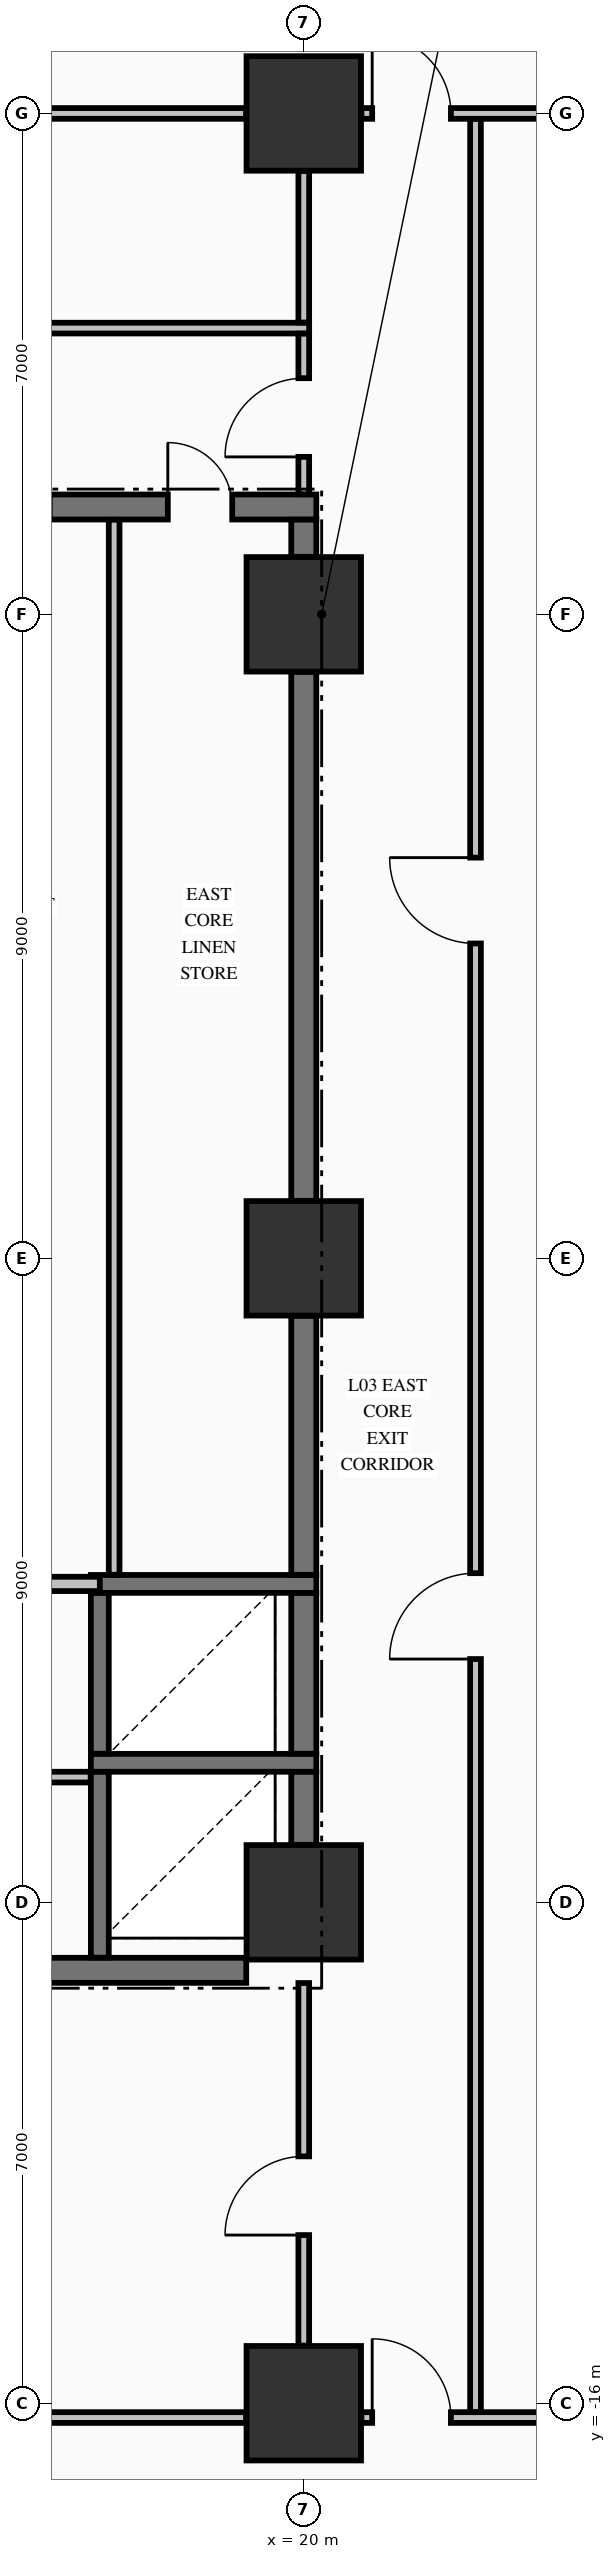
"""IFC4 building model, lengths in metres.
Left out: names, types, materials, properties, quantities, classifications, styles, units other than length and angle.
Written with IfcOpenShell. Run it as: python <this file> out.ifc"""

import sys

from ifc_helpers import new_model, si_unit, direction, frame, frame_2d, origin, origin_2d, place, context, subcontext, project, spatial, rectangle, extrude, element, fill, save


model = new_model("IFC4")
c1 = context("Model", 3, precision=1e-05, world=origin(), true_north=direction((0.0, 1.0)))
c2 = subcontext(c1, "Body", "Model", "MODEL_VIEW")
j1 = project(units=[si_unit("LENGTHUNIT", "METRE"), si_unit("PLANEANGLEUNIT", "RADIAN")], contexts=[c1])
p1 = place(None, origin())
s1 = spatial("IfcSite", under=j1, at=p1, CompositionType="ELEMENT")
p2 = place(p1, origin())
s2 = spatial("IfcBuilding", under=s1, at=p2, CompositionType="ELEMENT")
p3 = place(p2, frame((0.0, 0.0, 16.32)))
s3 = spatial("IfcBuildingStorey", under=s2, at=p3, CompositionType="ELEMENT", Elevation=16.32)
for number, where, z_axis, x_axis in (
    (1, (20.0, -16.0, 0.0), (0.0, 0.0, 1.0), (1.0, 0.0, 0.0)),
    (2, (20.0, -9.0, 0.0), (0.0, 0.0, 1.0), (1.0, 0.0, 0.0)),
    (3, (20.0, 0.0, 0.0), (0.0, 0.0, 1.0), (1.0, 0.0, 0.0)),
    (4, (20.0, 9.0, 0.0), (0.0, 0.0, 1.0), (1.0, 0.0, 0.0)),
    (5, (20.0, 16.0, 0.0), (0.0, 0.0, 1.0), (1.0, 0.0, 0.0)),
):
    element("IfcColumn", number, at=place(p3, frame(where, z_axis=z_axis, x_axis=x_axis)), inside=s3, PredefinedType="COLUMN", context=c2, shape_type="SweptSolid", body=[
        extrude(rectangle(XDim=1.6, YDim=1.6, at=origin_2d()), origin(), (0.0, 0.0, 1.0), 4.99),
    ])
p4 = place(p3, frame((14.7, -9.95, 0.0), z_axis=(0.0, 0.0, 1.0), x_axis=(1.0, 0.0, 0.0)))
e6 = element("IfcWall", 6, at=p4, inside=s3, PredefinedType="SHEAR", context=c2, shape_type="SweptSolid", body=[
    extrude(rectangle(XDim=4.496, YDim=0.35, at=frame_2d((2.248, 0.0))), origin(), (0.0, 0.0, 1.0), 4.99),
])
p5 = place(p4, frame((0.8, 0.0, 0.0)))
e7 = element("IfcOpeningElement", 7, at=p5, cuts=e6, PredefinedType="OPENING", context=c2, shape_type="SweptSolid", body=[
    extrude(rectangle(XDim=0.9, YDim=2.15, at=frame_2d((0.45, 1.075))), frame((0.0, 0.185, 0.0), z_axis=(0.0, -1.0, 0.0), x_axis=(1.0, 0.0, 0.0)), (0.0, 0.0, 1.0), 0.37),
])
for number, where, z_axis, x_axis in (
    (8, (17.025, -7.05, 0.0), (0.0, 0.0, 1.0), (1.0, 0.0, 0.0)),
    (9, (17.025, -4.55, 0.0), (0.0, 0.0, 1.0), (1.0, 0.0, 0.0)),
):
    element("IfcWall", number, at=place(p3, frame(where, z_axis=z_axis, x_axis=x_axis)), inside=s3, PredefinedType="SOLIDWALL", context=c2, shape_type="SweptSolid", body=[
        extrude(rectangle(XDim=3.15, YDim=0.25, at=frame_2d((1.575, 0.0))), origin(), (0.0, 0.0, 1.0), 4.99),
    ])
p6 = place(p3, frame((14.7, 10.5, 0.0), z_axis=(0.0, 0.0, 1.0), x_axis=(1.0, 0.0, 0.0)))
e10 = element("IfcWall", 10, at=p6, inside=s3, PredefinedType="SHEAR", context=c2, shape_type="SweptSolid", body=[
    extrude(rectangle(XDim=5.475, YDim=0.35, at=frame_2d((2.738, 0.0))), origin(), (0.0, 0.0, 1.0), 4.99),
])
p7 = place(p6, frame((0.85, 0.0, 0.0)))
e11 = element("IfcOpeningElement", 11, at=p7, cuts=e10, PredefinedType="OPENING", context=c2, shape_type="SweptSolid", body=[
    extrude(rectangle(XDim=0.9, YDim=2.15, at=frame_2d((0.45, 1.075))), frame((0.0, 0.185, 0.0), z_axis=(0.0, -1.0, 0.0), x_axis=(1.0, 0.0, 0.0)), (0.0, 0.0, 1.0), 0.37),
])
p8 = place(p6, frame((3.4, 0.0, 0.0)))
e12 = element("IfcOpeningElement", 12, at=p8, cuts=e10, PredefinedType="OPENING", context=c2, shape_type="SweptSolid", body=[
    extrude(rectangle(XDim=0.9, YDim=2.15, at=frame_2d((0.45, 1.075))), frame((0.0, 0.185, 0.0), z_axis=(0.0, -1.0, 0.0), x_axis=(1.0, 0.0, 0.0)), (0.0, 0.0, 1.0), 0.37),
])
p9 = place(p3, frame((11.806, -16.2, 0.0), z_axis=(0.0, 0.0, 1.0), x_axis=(1.0, 0.0, 0.0)))
e13 = element("IfcWall", 13, at=p9, inside=s3, PredefinedType="PARTITIONING", context=c2, shape_type="SweptSolid", body=[
    extrude(rectangle(XDim=7.388, YDim=0.15, at=frame_2d((3.694, 0.0))), origin(), (0.0, 0.0, 1.0), 3.332),
])
p10 = place(p9, frame((3.094, 0.0, 0.0)))
e14 = element("IfcOpeningElement", 14, at=p10, cuts=e13, PredefinedType="OPENING", context=c2, shape_type="SweptSolid", body=[
    extrude(rectangle(XDim=1.2, YDim=2.15, at=frame_2d((0.6, 1.075))), frame((0.0, 0.085, 0.0), z_axis=(0.0, -1.0, 0.0), x_axis=(1.0, 0.0, 0.0)), (0.0, 0.0, 1.0), 0.17),
])
p11 = place(p3, frame((20.806, -16.2, 0.0), z_axis=(0.0, 0.0, 1.0), x_axis=(1.0, 0.0, 0.0)))
e15 = element("IfcWall", 15, at=p11, inside=s3, PredefinedType="PARTITIONING", context=c2, shape_type="SweptSolid", body=[
    extrude(rectangle(XDim=4.488, YDim=0.15, at=frame_2d((2.244, 0.0))), origin(), (0.0, 0.0, 1.0), 3.332),
])
p12 = place(p11, frame((0.15, 0.0, 0.0)))
e16 = element("IfcOpeningElement", 16, at=p12, cuts=e15, PredefinedType="OPENING", context=c2, shape_type="SweptSolid", body=[
    extrude(rectangle(XDim=1.1, YDim=2.15, at=frame_2d((0.55, 1.075))), frame((0.0, 0.085, 0.0), z_axis=(0.0, -1.0, 0.0), x_axis=(1.0, 0.0, 0.0)), (0.0, 0.0, 1.0), 0.17),
])
p13 = place(p11, frame((2.844, 0.0, 0.0)))
e17 = element("IfcOpeningElement", 17, at=p13, cuts=e15, PredefinedType="OPENING", context=c2, shape_type="SweptSolid", body=[
    extrude(rectangle(XDim=1.1, YDim=2.15, at=frame_2d((0.55, 1.075))), frame((0.0, 0.085, 0.0), z_axis=(0.0, -1.0, 0.0), x_axis=(1.0, 0.0, 0.0)), (0.0, 0.0, 1.0), 0.17),
])
p14 = place(p3, frame((14.878, -7.25, 0.0), z_axis=(0.0, 0.0, 1.0), x_axis=(1.0, 0.0, 0.0)))
e18 = element("IfcWall", 18, at=p14, inside=s3, PredefinedType="PARTITIONING", context=c2, shape_type="SweptSolid", body=[
    extrude(rectangle(XDim=2.144, YDim=0.15, at=frame_2d((1.072, 0.0))), origin(), (0.0, 0.0, 1.0), 4.99),
])
p15 = place(p14, frame((0.597, 0.0, 0.0)))
e19 = element("IfcOpeningElement", 19, at=p15, cuts=e18, PredefinedType="OPENING", context=c2, shape_type="SweptSolid", body=[
    extrude(rectangle(XDim=0.95, YDim=2.15, at=frame_2d((0.475, 1.075))), frame((0.0, 0.085, 0.0), z_axis=(0.0, -1.0, 0.0), x_axis=(1.0, 0.0, 0.0)), (0.0, 0.0, 1.0), 0.17),
])
p16 = place(p3, frame((14.878, -4.55, 0.0), z_axis=(0.0, 0.0, 1.0), x_axis=(1.0, 0.0, 0.0)))
e20 = element("IfcWall", 20, at=p16, inside=s3, PredefinedType="PARTITIONING", context=c2, shape_type="SweptSolid", body=[
    extrude(rectangle(XDim=2.272, YDim=0.2, at=frame_2d((1.136, 0.0))), origin(), (0.0, 0.0, 1.0), 4.99),
])
p17 = place(p3, frame((8.66, 13.0, 0.0), z_axis=(0.0, 0.0, 1.0), x_axis=(1.0, 0.0, 0.0)))
e21 = element("IfcWall", 21, at=p17, inside=s3, PredefinedType="PARTITIONING", context=c2, shape_type="SweptSolid", body=[
    extrude(rectangle(XDim=11.415, YDim=0.15, at=frame_2d((5.708, 0.0))), origin(), (0.0, 0.0, 1.0), 4.99),
])
p18 = place(p17, frame((0.59, 0.0, 0.0)))
e22 = element("IfcOpeningElement", 22, at=p18, cuts=e21, PredefinedType="OPENING", context=c2, shape_type="SweptSolid", body=[
    extrude(rectangle(XDim=1.1, YDim=2.15, at=frame_2d((0.55, 1.075))), frame((0.0, 0.085, 0.0), z_axis=(0.0, -1.0, 0.0), x_axis=(1.0, 0.0, 0.0)), (0.0, 0.0, 1.0), 0.17),
])
p19 = place(p3, frame((11.806, 16.0, 0.0), z_axis=(0.0, 0.0, 1.0), x_axis=(1.0, 0.0, 0.0)))
e23 = element("IfcWall", 23, at=p19, inside=s3, PredefinedType="PARTITIONING", context=c2, shape_type="SweptSolid", body=[
    extrude(rectangle(XDim=7.388, YDim=0.15, at=frame_2d((3.694, 0.0))), origin(), (0.0, 0.0, 1.0), 3.332),
])
p20 = place(p19, frame((3.144, 0.0, 0.0)))
e24 = element("IfcOpeningElement", 24, at=p20, cuts=e23, PredefinedType="OPENING", context=c2, shape_type="SweptSolid", body=[
    extrude(rectangle(XDim=1.1, YDim=2.15, at=frame_2d((0.55, 1.075))), frame((0.0, 0.085, 0.0), z_axis=(0.0, -1.0, 0.0), x_axis=(1.0, 0.0, 0.0)), (0.0, 0.0, 1.0), 0.17),
])
p21 = place(p3, frame((20.806, 16.0, 0.0), z_axis=(0.0, 0.0, 1.0), x_axis=(1.0, 0.0, 0.0)))
e25 = element("IfcWall", 25, at=p21, inside=s3, PredefinedType="PARTITIONING", context=c2, shape_type="SweptSolid", body=[
    extrude(rectangle(XDim=4.488, YDim=0.15, at=frame_2d((2.244, 0.0))), origin(), (0.0, 0.0, 1.0), 3.332),
])
p22 = place(p21, frame((0.15, 0.0, 0.0)))
e26 = element("IfcOpeningElement", 26, at=p22, cuts=e25, PredefinedType="OPENING", context=c2, shape_type="SweptSolid", body=[
    extrude(rectangle(XDim=1.1, YDim=2.15, at=frame_2d((0.55, 1.075))), frame((0.0, 0.085, 0.0), z_axis=(0.0, -1.0, 0.0), x_axis=(1.0, 0.0, 0.0)), (0.0, 0.0, 1.0), 0.17),
])
p23 = place(p21, frame((2.844, 0.0, 0.0)))
e27 = element("IfcOpeningElement", 27, at=p23, cuts=e25, PredefinedType="OPENING", context=c2, shape_type="SweptSolid", body=[
    extrude(rectangle(XDim=1.1, YDim=2.15, at=frame_2d((0.55, 1.075))), frame((0.0, 0.085, 0.0), z_axis=(0.0, -1.0, 0.0), x_axis=(1.0, 0.0, 0.0)), (0.0, 0.0, 1.0), 0.17),
])
p24 = place(p3, frame((17.15, -9.773, 0.0), z_axis=(0.0, 0.0, 1.0), x_axis=(0.0, 1.0, 0.0)))
e28 = element("IfcWall", 28, at=p24, inside=s3, PredefinedType="SOLIDWALL", context=c2, shape_type="SweptSolid", body=[
    extrude(rectangle(XDim=2.596, YDim=0.25, at=frame_2d((1.298, 0.0))), origin(), (0.0, 0.0, 1.0), 4.99),
])
p25 = place(p3, frame((17.15, -6.923, 0.0), z_axis=(0.0, 0.0, 1.0), x_axis=(0.0, 1.0, 0.0)))
e29 = element("IfcWall", 29, at=p25, inside=s3, PredefinedType="SOLIDWALL", context=c2, shape_type="SweptSolid", body=[
    extrude(rectangle(XDim=2.246, YDim=0.25, at=frame_2d((1.123, 0.0))), origin(), (0.0, 0.0, 1.0), 4.99),
])
p26 = place(p3, frame((20.0, -8.196, 0.0), z_axis=(0.0, 0.0, 1.0), x_axis=(0.0, 1.0, 0.0)))
e30 = element("IfcWall", 30, at=p26, inside=s3, PredefinedType="SHEAR", context=c2, shape_type="SweptSolid", body=[
    extrude(rectangle(XDim=1.019, YDim=0.35, at=frame_2d((0.51, 0.0))), origin(), (0.0, 0.0, 1.0), 4.99),
])
p27 = place(p3, frame((20.0, -6.923, 0.0), z_axis=(0.0, 0.0, 1.0), x_axis=(0.0, 1.0, 0.0)))
e31 = element("IfcWall", 31, at=p27, inside=s3, PredefinedType="SHEAR", context=c2, shape_type="SweptSolid", body=[
    extrude(rectangle(XDim=2.246, YDim=0.35, at=frame_2d((1.123, 0.0))), origin(), (0.0, 0.0, 1.0), 4.99),
])
p28 = place(p3, frame((20.0, -4.423, 0.0), z_axis=(0.0, 0.0, 1.0), x_axis=(0.0, 1.0, 0.0)))
e32 = element("IfcWall", 32, at=p28, inside=s3, PredefinedType="SHEAR", context=c2, shape_type="SweptSolid", body=[
    extrude(rectangle(XDim=3.619, YDim=0.35, at=frame_2d((1.81, 0.0))), origin(), (0.0, 0.0, 1.0), 4.99),
])
p29 = place(p3, frame((20.0, 0.804, 0.0), z_axis=(0.0, 0.0, 1.0), x_axis=(0.0, 1.0, 0.0)))
e33 = element("IfcWall", 33, at=p29, inside=s3, PredefinedType="SHEAR", context=c2, shape_type="SweptSolid", body=[
    extrude(rectangle(XDim=7.392, YDim=0.35, at=frame_2d((3.696, 0.0))), origin(), (0.0, 0.0, 1.0), 4.99),
])
p30 = place(p3, frame((20.0, 9.804, 0.0), z_axis=(0.0, 0.0, 1.0), x_axis=(0.0, 1.0, 0.0)))
e34 = element("IfcWall", 34, at=p30, inside=s3, PredefinedType="SHEAR", context=c2, shape_type="SweptSolid", body=[
    extrude(rectangle(XDim=0.519, YDim=0.35, at=frame_2d((0.26, 0.0))), origin(), (0.0, 0.0, 1.0), 4.99),
])
p31 = place(p3, frame((17.35, -4.422, 0.0), z_axis=(0.0, 0.0, 1.0), x_axis=(0.0, 1.0, 0.0)))
e35 = element("IfcWall", 35, at=p31, inside=s3, PredefinedType="PARTITIONING", context=c2, shape_type="SweptSolid", body=[
    extrude(rectangle(XDim=14.744, YDim=0.15, at=frame_2d((7.372, 0.0))), origin(), (0.0, 0.0, 1.0), 4.99),
])
p32 = place(p3, frame((20.0, -15.194, 0.0), z_axis=(0.0, 0.0, 1.0), x_axis=(0.0, 1.0, 0.0)))
e36 = element("IfcWall", 36, at=p32, inside=s3, PredefinedType="PARTITIONING", context=c2, shape_type="SweptSolid", body=[
    extrude(rectangle(XDim=5.066, YDim=0.15, at=frame_2d((2.533, 0.0))), origin(), (0.0, 0.0, 1.0), 4.032),
])
p33 = place(p32, frame((1.544, 0.0, 0.0)))
e37 = element("IfcOpeningElement", 37, at=p33, cuts=e36, PredefinedType="OPENING", context=c2, shape_type="SweptSolid", body=[
    extrude(rectangle(XDim=1.1, YDim=2.15, at=frame_2d((0.55, 1.075))), frame((0.0, 0.085, 0.0), z_axis=(0.0, -1.0, 0.0), x_axis=(1.0, 0.0, 0.0)), (0.0, 0.0, 1.0), 0.17),
])
p34 = place(p3, frame((20.0, 10.678, 0.0), z_axis=(0.0, 0.0, 1.0), x_axis=(0.0, 1.0, 0.0)))
e38 = element("IfcWall", 38, at=p34, inside=s3, PredefinedType="PARTITIONING", context=c2, shape_type="SweptSolid", body=[
    extrude(rectangle(XDim=2.244, YDim=0.15, at=frame_2d((1.122, 0.0))), origin(), (0.0, 0.0, 1.0), 3.332),
])
p35 = place(p34, frame((0.522, 0.0, 0.0)))
e39 = element("IfcOpeningElement", 39, at=p35, cuts=e38, PredefinedType="OPENING", context=c2, shape_type="SweptSolid", body=[
    extrude(rectangle(XDim=1.1, YDim=2.15, at=frame_2d((0.55, 1.075))), frame((0.0, 0.085, 0.0), z_axis=(0.0, -1.0, 0.0), x_axis=(1.0, 0.0, 0.0)), (0.0, 0.0, 1.0), 0.17),
])
p36 = place(p3, frame((20.0, 13.078, 0.0), z_axis=(0.0, 0.0, 1.0), x_axis=(0.0, 1.0, 0.0)))
e40 = element("IfcWall", 40, at=p36, inside=s3, PredefinedType="PARTITIONING", context=c2, shape_type="SweptSolid", body=[
    extrude(rectangle(XDim=2.116, YDim=0.15, at=frame_2d((1.058, 0.0))), origin(), (0.0, 0.0, 1.0), 3.332),
])
p37 = place(p3, frame((22.4, -16.122, 0.0), z_axis=(0.0, 0.0, 1.0), x_axis=(0.0, 1.0, 0.0)))
e41 = element("IfcWall", 41, at=p37, inside=s3, PredefinedType="PARTITIONING", context=c2, shape_type="SweptSolid", body=[
    extrude(rectangle(XDim=32.044, YDim=0.15, at=frame_2d((16.022, 0.0))), origin(), (0.0, 0.0, 1.0), 4.99),
])
p38 = place(p37, frame((10.522, 0.0, 0.0)))
e42 = element("IfcOpeningElement", 42, at=p38, cuts=e41, PredefinedType="OPENING", context=c2, shape_type="SweptSolid", body=[
    extrude(rectangle(XDim=1.2, YDim=2.15, at=frame_2d((0.6, 1.075))), frame((0.0, 0.085, 0.0), z_axis=(0.0, -1.0, 0.0), x_axis=(1.0, 0.0, 0.0)), (0.0, 0.0, 1.0), 0.17),
])
p39 = place(p37, frame((20.522, 0.0, 0.0)))
e43 = element("IfcOpeningElement", 43, at=p39, cuts=e41, PredefinedType="OPENING", context=c2, shape_type="SweptSolid", body=[
    extrude(rectangle(XDim=1.2, YDim=2.15, at=frame_2d((0.6, 1.075))), frame((0.0, 0.085, 0.0), z_axis=(0.0, -1.0, 0.0), x_axis=(1.0, 0.0, 0.0)), (0.0, 0.0, 1.0), 0.17),
])
p40 = place(p8, origin())
e44 = element("IfcDoor", 44, at=p40, inside=s3, OperationType="SINGLE_SWING_LEFT", PredefinedType="DOOR", context=c2, shape_type="SweptSolid", body=[
    extrude(rectangle(XDim=0.9, YDim=2.15, at=frame_2d((0.45, 1.075))), frame((0.0, 0.025, 0.0), z_axis=(0.0, -1.0, 0.0), x_axis=(1.0, 0.0, 0.0)), (0.0, 0.0, 1.0), 0.05),
])
fill(e12, e44)
p41 = place(p22, origin())
e45 = element("IfcDoor", 45, at=p41, inside=s3, OperationType="SINGLE_SWING_LEFT", PredefinedType="DOOR", context=c2, shape_type="SweptSolid", body=[
    extrude(rectangle(XDim=1.1, YDim=2.15, at=frame_2d((0.55, 1.075))), frame((0.0, 0.025, 0.0), z_axis=(0.0, -1.0, 0.0), x_axis=(1.0, 0.0, 0.0)), (0.0, 0.0, 1.0), 0.05),
])
fill(e26, e45)
p42 = place(p35, origin())
e46 = element("IfcDoor", 46, at=p42, inside=s3, OperationType="SINGLE_SWING_LEFT", PredefinedType="DOOR", context=c2, shape_type="SweptSolid", body=[
    extrude(rectangle(XDim=1.1, YDim=2.15, at=frame_2d((0.55, 1.075))), frame((0.0, 0.025, 0.0), z_axis=(0.0, -1.0, 0.0), x_axis=(1.0, 0.0, 0.0)), (0.0, 0.0, 1.0), 0.05),
])
fill(e39, e46)
p43 = place(p33, origin())
e47 = element("IfcDoor", 47, at=p43, inside=s3, OperationType="SINGLE_SWING_LEFT", PredefinedType="DOOR", context=c2, shape_type="SweptSolid", body=[
    extrude(rectangle(XDim=1.1, YDim=2.15, at=frame_2d((0.55, 1.075))), frame((0.0, 0.025, 0.0), z_axis=(0.0, -1.0, 0.0), x_axis=(1.0, 0.0, 0.0)), (0.0, 0.0, 1.0), 0.05),
])
fill(e37, e47)
p44 = place(p12, origin())
e48 = element("IfcDoor", 48, at=p44, inside=s3, OperationType="SINGLE_SWING_LEFT", PredefinedType="DOOR", context=c2, shape_type="SweptSolid", body=[
    extrude(rectangle(XDim=1.1, YDim=2.15, at=frame_2d((0.55, 1.075))), frame((0.0, 0.025, 0.0), z_axis=(0.0, -1.0, 0.0), x_axis=(1.0, 0.0, 0.0)), (0.0, 0.0, 1.0), 0.05),
])
fill(e16, e48)
p45 = place(p38, origin())
e49 = element("IfcDoor", 49, at=p45, inside=s3, OperationType="SINGLE_SWING_LEFT", PredefinedType="DOOR", context=c2, shape_type="SweptSolid", body=[
    extrude(rectangle(XDim=1.2, YDim=2.15, at=frame_2d((0.6, 1.075))), frame((0.0, 0.025, 0.0), z_axis=(0.0, -1.0, 0.0), x_axis=(1.0, 0.0, 0.0)), (0.0, 0.0, 1.0), 0.05),
])
fill(e42, e49)
p46 = place(p39, origin())
e50 = element("IfcDoor", 50, at=p46, inside=s3, OperationType="SINGLE_SWING_RIGHT", PredefinedType="DOOR", context=c2, shape_type="SweptSolid", body=[
    extrude(rectangle(XDim=1.2, YDim=2.15, at=frame_2d((0.6, 1.075))), frame((0.0, 0.025, 0.0), z_axis=(0.0, -1.0, 0.0), x_axis=(1.0, 0.0, 0.0)), (0.0, 0.0, 1.0), 0.05),
])
fill(e43, e50)
save(model, sys.argv[1])
